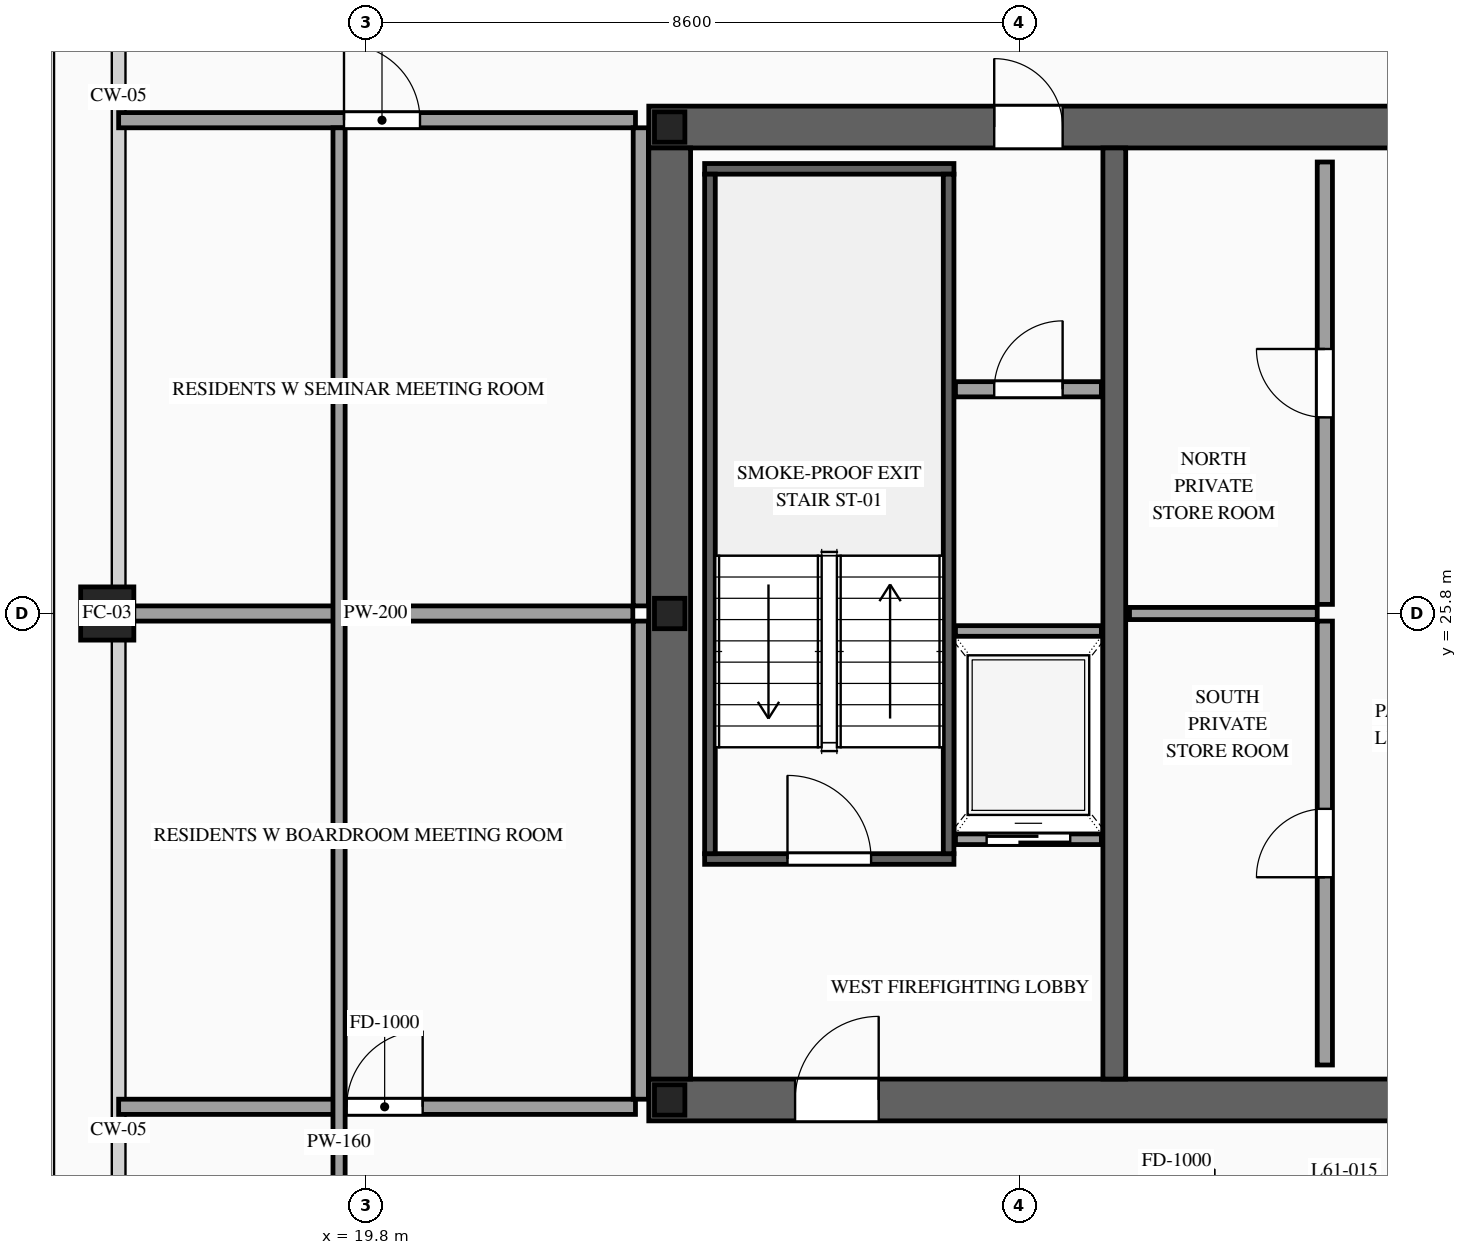
"""IFC4 building model, lengths in metres.
Left out: names, types, materials, properties, quantities, classifications, styles, units other than length and angle.
Written with IfcOpenShell. Run it as: python <this file> out.ifc"""

import sys

from ifc_helpers import new_model, si_unit, direction, frame, frame_2d, origin, origin_2d, place, context, subcontext, project, spatial, rectangle, hollow_rectangle, i_section, extrude, source, transform, mapped, element, fill, save


model = new_model("IFC4")
c1 = context("Model", 3, precision=1e-05, world=origin(), true_north=direction((0.0, 1.0)))
c2 = subcontext(c1, "Body", "Model", "MODEL_VIEW")
j1 = project(units=[si_unit("LENGTHUNIT", "METRE"), si_unit("PLANEANGLEUNIT", "RADIAN")], contexts=[c1])
p1 = place(None, origin())
s1 = spatial("IfcSite", under=j1, at=p1, CompositionType="ELEMENT")
p2 = place(p1, origin())
s2 = spatial("IfcBuilding", under=s1, at=p2, CompositionType="ELEMENT")
p3 = place(p2, frame((0.0, 0.0, 231.1)))
s3 = spatial("IfcBuildingStorey", under=s2, at=p3, CompositionType="ELEMENT", Elevation=231.1)
p4 = place(p3, frame((23.525, 19.4, 0.0), z_axis=(0.0, 0.0, 1.0), x_axis=(1.0, 0.0, 0.0)))
e1 = element("IfcWall", 1, at=p4, inside=s3, PredefinedType="SHEAR", context=c2, shape_type="SweptSolid", body=[
    extrude(rectangle(XDim=26.95, YDim=0.55, at=frame_2d((13.475, 0.0))), origin(), (0.0, 0.0, 1.0), 3.5),
])
p5 = place(p4, frame((1.925, 0.0, 0.0)))
e2 = element("IfcOpeningElement", 2, at=p5, cuts=e1, PredefinedType="OPENING", context=c2, shape_type="SweptSolid", body=[
    extrude(rectangle(XDim=1.1, YDim=2.2, at=frame_2d((0.55, 1.1))), frame((0.0, 0.29, 0.0), z_axis=(0.0, -1.0, 0.0), x_axis=(1.0, 0.0, 0.0)), (0.0, 0.0, 1.0), 0.58),
])
p6 = place(p4, frame((9.825, 0.0, 0.0)))
e3 = element("IfcOpeningElement", 3, at=p6, cuts=e1, PredefinedType="OPENING", context=c2, shape_type="SweptSolid", body=[
    extrude(rectangle(XDim=1.1, YDim=2.2, at=frame_2d((0.55, 1.1))), frame((0.0, 0.29, 0.0), z_axis=(0.0, -1.0, 0.0), x_axis=(1.0, 0.0, 0.0)), (0.0, 0.0, 1.0), 0.58),
])
p7 = place(p4, frame((23.025, 0.0, 0.0)))
e4 = element("IfcOpeningElement", 4, at=p7, cuts=e1, PredefinedType="OPENING", context=c2, shape_type="SweptSolid", body=[
    extrude(rectangle(XDim=1.1, YDim=2.2, at=frame_2d((0.55, 1.1))), frame((0.0, 0.29, 0.0), z_axis=(0.0, -1.0, 0.0), x_axis=(1.0, 0.0, 0.0)), (0.0, 0.0, 1.0), 0.58),
])
p8 = place(p4, frame((19.645, 0.0, 0.0)))
e5 = element("IfcOpeningElement", 5, at=p8, cuts=e1, PredefinedType="OPENING", context=c2, shape_type="SweptSolid", body=[
    extrude(rectangle(XDim=0.9, YDim=2.15, at=frame_2d((0.45, 1.075))), frame((0.0, 0.29, 0.0), z_axis=(0.0, -1.0, 0.0), x_axis=(1.0, 0.0, 0.0)), (0.0, 0.0, 1.0), 0.58),
])
p9 = place(p4, frame((18.205, 0.0, 0.0)))
e6 = element("IfcOpeningElement", 6, at=p9, cuts=e1, PredefinedType="OPENING", context=c2, shape_type="SweptSolid", body=[
    extrude(rectangle(XDim=0.9, YDim=2.15, at=frame_2d((0.45, 1.075))), frame((0.0, 0.29, 0.0), z_axis=(0.0, -1.0, 0.0), x_axis=(1.0, 0.0, 0.0)), (0.0, 0.0, 1.0), 0.58),
])
p10 = place(p3, frame((23.525, 32.2, 0.0), z_axis=(0.0, 0.0, 1.0), x_axis=(1.0, 0.0, 0.0)))
e7 = element("IfcWall", 7, at=p10, inside=s3, PredefinedType="SHEAR", context=c2, shape_type="SweptSolid", body=[
    extrude(rectangle(XDim=26.95, YDim=0.55, at=frame_2d((13.475, 0.0))), origin(), (0.0, 0.0, 1.0), 3.5),
])
p11 = place(p10, frame((4.545, 0.0, 0.0)))
e8 = element("IfcOpeningElement", 8, at=p11, cuts=e7, PredefinedType="OPENING", context=c2, shape_type="SweptSolid", body=[
    extrude(rectangle(XDim=0.9, YDim=2.15, at=frame_2d((0.45, 1.075))), frame((0.0, 0.29, 0.0), z_axis=(0.0, -1.0, 0.0), x_axis=(1.0, 0.0, 0.0)), (0.0, 0.0, 1.0), 0.58),
])
p12 = place(p10, frame((9.825, 0.0, 0.0)))
e9 = element("IfcOpeningElement", 9, at=p12, cuts=e7, PredefinedType="OPENING", context=c2, shape_type="SweptSolid", body=[
    extrude(rectangle(XDim=1.1, YDim=2.2, at=frame_2d((0.55, 1.1))), frame((0.0, 0.29, 0.0), z_axis=(0.0, -1.0, 0.0), x_axis=(1.0, 0.0, 0.0)), (0.0, 0.0, 1.0), 0.58),
])
p13 = place(p10, frame((15.675, 0.0, 0.0)))
e10 = element("IfcOpeningElement", 10, at=p13, cuts=e7, PredefinedType="OPENING", context=c2, shape_type="SweptSolid", body=[
    extrude(rectangle(XDim=1.1, YDim=2.2, at=frame_2d((0.55, 1.1))), frame((0.0, 0.29, 0.0), z_axis=(0.0, -1.0, 0.0), x_axis=(1.0, 0.0, 0.0)), (0.0, 0.0, 1.0), 0.58),
])
p14 = place(p10, frame((19.645, 0.0, 0.0)))
e11 = element("IfcOpeningElement", 11, at=p14, cuts=e7, PredefinedType="OPENING", context=c2, shape_type="SweptSolid", body=[
    extrude(rectangle(XDim=0.9, YDim=2.15, at=frame_2d((0.45, 1.075))), frame((0.0, 0.29, 0.0), z_axis=(0.0, -1.0, 0.0), x_axis=(1.0, 0.0, 0.0)), (0.0, 0.0, 1.0), 0.58),
])
m1 = source(origin(), c2, "Body", "SweptSolid", [
    extrude(rectangle(XDim=12.25, YDim=0.55, at=frame_2d((6.125, 0.0))), origin(), (0.0, 0.0, 1.0), 3.5),
])
p15 = place(p3, frame((23.8, 19.675, 0.0), z_axis=(0.0, 0.0, 1.0), x_axis=(0.0, 1.0, 0.0)))
e12 = element("IfcWall", 12, at=p15, inside=s3, PredefinedType="SHEAR", context=c2, shape_type="MappedRepresentation", body=[
    mapped(m1, transform((0.0, 0.0, 0.0), scale=1.0)),
])
m2 = source(origin(), c2, "Body", "SweptSolid", [
    extrude(rectangle(XDim=12.25, YDim=0.3, at=frame_2d((6.125, 0.0))), origin(), (0.0, 0.0, 1.0), 3.5),
])
p16 = place(p3, frame((29.65, 19.675, 0.0), z_axis=(0.0, 0.0, 1.0), x_axis=(0.0, 1.0, 0.0)))
e13 = element("IfcWall", 13, at=p16, inside=s3, PredefinedType="SOLIDWALL", context=c2, shape_type="MappedRepresentation", body=[
    mapped(m2, transform((0.0, 0.0, 0.0), scale=1.0)),
])
m3 = source(origin(), c2, "Body", "SweptSolid", [
    extrude(i_section(OverallWidth=0.4, OverallDepth=0.4, WebThickness=0.013, FlangeThickness=0.021, at=origin_2d()), origin(), (0.0, 0.0, 1.0), 3.5),
])
for number, where, z_axis, x_axis in (
    (14, (23.8, 19.4, 0.0), (0.0, 0.0, 1.0), (1.0, 0.0, 0.0)),
    (15, (23.8, 25.8, 0.0), (0.0, 0.0, 1.0), (1.0, 0.0, 0.0)),
    (16, (23.8, 32.2, 0.0), (0.0, 0.0, 1.0), (1.0, 0.0, 0.0)),
):
    element("IfcColumn", number, at=place(p3, frame(where, z_axis=z_axis, x_axis=x_axis)), inside=s3, PredefinedType="COLUMN", context=c2, shape_type="MappedRepresentation", body=[
        mapped(m3, transform((0.0, 0.0, 0.0), scale=1.0)),
    ])
m4 = source(origin(), c2, "Body", "SweptSolid", [
    extrude(hollow_rectangle(XDim=0.7, YDim=0.7, WallThickness=0.032, at=origin_2d()), origin(), (0.0, 0.0, 1.0), 3.5),
])
p17 = place(p3, frame((16.4, 25.8, 0.0), z_axis=(0.0, 0.0, 1.0), x_axis=(1.0, 0.0, 0.0)))
e17 = element("IfcColumn", 17, at=p17, inside=s3, PredefinedType="COLUMN", context=c2, shape_type="MappedRepresentation", body=[
    mapped(m4, transform((0.0, 0.0, 0.0), scale=1.0)),
])
p18 = place(p3, frame((27.56, 22.83, 0.0), z_axis=(0.0, 0.0, 1.0), x_axis=(1.0, 0.0, 0.0)))
e18 = element("IfcWall", 18, at=p18, inside=s3, PredefinedType="SOLIDWALL", context=c2, shape_type="SweptSolid", body=[
    extrude(rectangle(XDim=1.92, YDim=0.14, at=frame_2d((0.96, 0.0))), origin(), (0.0, 0.0, 1.0), 3.28),
])
p19 = place(p18, frame((0.41, 0.0, 0.0)))
e19 = element("IfcOpeningElement", 19, at=p19, cuts=e18, PredefinedType="OPENING", context=c2, shape_type="SweptSolid", body=[
    extrude(rectangle(XDim=1.1, YDim=2.2, at=frame_2d((0.55, 1.1))), frame((0.0, 0.085, 0.0), z_axis=(0.0, -1.0, 0.0), x_axis=(1.0, 0.0, 0.0)), (0.0, 0.0, 1.0), 0.17),
])
m5 = source(origin(), c2, "Body", "SweptSolid", [
    extrude(rectangle(XDim=1.92, YDim=0.14, at=frame_2d((0.96, 0.0))), origin(), (0.0, 0.0, 1.0), 3.28),
])
p20 = place(p3, frame((27.56, 25.57, 0.0), z_axis=(0.0, 0.0, 1.0), x_axis=(1.0, 0.0, 0.0)))
e20 = element("IfcWall", 20, at=p20, inside=s3, PredefinedType="SOLIDWALL", context=c2, shape_type="MappedRepresentation", body=[
    mapped(m5, transform((0.0, 0.0, 0.0), scale=1.0)),
])
p21 = place(p3, frame((24.26, 22.57, 0.0), z_axis=(0.0, 0.0, 1.0), x_axis=(1.0, 0.0, 0.0)))
e21 = element("IfcWall", 21, at=p21, inside=s3, PredefinedType="SOLIDWALL", context=c2, shape_type="SweptSolid", body=[
    extrude(rectangle(XDim=3.28, YDim=0.14, at=frame_2d((1.64, 0.0))), origin(), (0.0, 0.0, 1.0), 3.28),
])
p22 = place(p21, frame((1.09, 0.0, 0.0)))
e22 = element("IfcOpeningElement", 22, at=p22, cuts=e21, PredefinedType="OPENING", context=c2, shape_type="SweptSolid", body=[
    extrude(rectangle(XDim=1.1, YDim=2.2, at=frame_2d((0.55, 1.1))), frame((0.0, 0.085, 0.0), z_axis=(0.0, -1.0, 0.0), x_axis=(1.0, 0.0, 0.0)), (0.0, 0.0, 1.0), 0.17),
])
m6 = source(origin(), c2, "Body", "SweptSolid", [
    extrude(rectangle(XDim=3.28, YDim=0.14, at=frame_2d((1.64, 0.0))), origin(), (0.0, 0.0, 1.0), 3.28),
])
p23 = place(p3, frame((24.26, 31.65, 0.0), z_axis=(0.0, 0.0, 1.0), x_axis=(1.0, 0.0, 0.0)))
e23 = element("IfcWall", 23, at=p23, inside=s3, PredefinedType="SOLIDWALL", context=c2, shape_type="MappedRepresentation", body=[
    mapped(m6, transform((0.0, 0.0, 0.0), scale=1.0)),
])
m7 = source(origin(), c2, "Body", "SweptSolid", [
    extrude(rectangle(XDim=8.94, YDim=0.14, at=frame_2d((4.47, 0.0))), origin(), (0.0, 0.0, 1.0), 3.28),
])
for number, where, z_axis, x_axis in (
    (24, (24.33, 22.64, 0.0), (0.0, 0.0, 1.0), (0.0, 1.0, 0.0)),
    (25, (27.47, 22.64, 0.0), (0.0, 0.0, 1.0), (0.0, 1.0, 0.0)),
):
    element("IfcWall", number, at=place(p3, frame(where, z_axis=z_axis, x_axis=x_axis)), inside=s3, PredefinedType="SOLIDWALL", context=c2, shape_type="MappedRepresentation", body=[
        mapped(m7, transform((0.0, 0.0, 0.0), scale=1.0)),
    ])
p24 = place(p3, frame((27.56, 28.75, 0.0), z_axis=(0.0, 0.0, 1.0), x_axis=(1.0, 0.0, 0.0)))
e26 = element("IfcWall", 26, at=p24, inside=s3, PredefinedType="PARTITIONING", context=c2, shape_type="SweptSolid", body=[
    extrude(rectangle(XDim=1.92, YDim=0.2, at=frame_2d((0.96, 0.0))), origin(), (0.0, 0.0, 1.0), 3.28),
])
p25 = place(p24, frame((0.51, 0.0, 0.0)))
e27 = element("IfcOpeningElement", 27, at=p25, cuts=e26, PredefinedType="OPENING", context=c2, shape_type="SweptSolid", body=[
    extrude(rectangle(XDim=0.9, YDim=2.15, at=frame_2d((0.45, 1.075))), frame((0.0, 0.115, 0.0), z_axis=(0.0, -1.0, 0.0), x_axis=(1.0, 0.0, 0.0)), (0.0, 0.0, 1.0), 0.23),
])
p26 = place(p3, frame((32.42, 19.86, 0.0), z_axis=(0.0, 0.0, 1.0), x_axis=(0.0, 1.0, 0.0)))
e28 = element("IfcWall", 28, at=p26, inside=s3, PredefinedType="PARTITIONING", context=c2, shape_type="SweptSolid", body=[
    extrude(rectangle(XDim=5.84, YDim=0.2, at=frame_2d((2.92, 0.0))), origin(), (0.0, 0.0, 1.0), 3.28),
])
p27 = place(p26, frame((2.47, 0.0, 0.0)))
e29 = element("IfcOpeningElement", 29, at=p27, cuts=e28, PredefinedType="OPENING", context=c2, shape_type="SweptSolid", body=[
    extrude(rectangle(XDim=0.9, YDim=2.15, at=frame_2d((0.45, 1.075))), frame((0.0, 0.115, 0.0), z_axis=(0.0, -1.0, 0.0), x_axis=(1.0, 0.0, 0.0)), (0.0, 0.0, 1.0), 0.23),
])
p28 = place(p3, frame((32.42, 25.92, 0.0), z_axis=(0.0, 0.0, 1.0), x_axis=(0.0, 1.0, 0.0)))
e30 = element("IfcWall", 30, at=p28, inside=s3, PredefinedType="PARTITIONING", context=c2, shape_type="SweptSolid", body=[
    extrude(rectangle(XDim=5.82, YDim=0.2, at=frame_2d((2.91, 0.0))), origin(), (0.0, 0.0, 1.0), 3.28),
])
p29 = place(p28, frame((2.46, 0.0, 0.0)))
e31 = element("IfcOpeningElement", 31, at=p29, cuts=e30, PredefinedType="OPENING", context=c2, shape_type="SweptSolid", body=[
    extrude(rectangle(XDim=0.9, YDim=2.15, at=frame_2d((0.45, 1.075))), frame((0.0, 0.115, 0.0), z_axis=(0.0, -1.0, 0.0), x_axis=(1.0, 0.0, 0.0)), (0.0, 0.0, 1.0), 0.23),
])
m8 = source(origin(), c2, "Body", "SweptSolid", [
    extrude(rectangle(XDim=2.47, YDim=0.16, at=frame_2d((1.235, 0.0))), origin(), (0.0, 0.0, 1.0), 3.28),
])
p30 = place(p3, frame((29.85, 25.8, 0.0), z_axis=(0.0, 0.0, 1.0), x_axis=(1.0, 0.0, 0.0)))
e32 = element("IfcWall", 32, at=p30, inside=s3, PredefinedType="PARTITIONING", context=c2, shape_type="MappedRepresentation", body=[
    mapped(m8, transform((0.0, 0.0, 0.0), scale=1.0)),
])
p31 = place(p3, frame((16.55, 19.31, 0.0), z_axis=(0.0, 0.0, 1.0), x_axis=(1.0, 0.0, 0.0)))
e33 = element("IfcWall", 33, at=p31, inside=s3, PredefinedType="PARTITIONING", context=c2, shape_type="SweptSolid", body=[
    extrude(rectangle(XDim=6.8, YDim=0.2, at=frame_2d((3.4, 0.0))), origin(), (0.0, 0.0, 1.0), 2.825),
])
p32 = place(p31, frame((3.0, 0.0, 0.0)))
e34 = element("IfcOpeningElement", 34, at=p32, cuts=e33, PredefinedType="OPENING", context=c2, shape_type="SweptSolid", body=[
    extrude(rectangle(XDim=1.0, YDim=2.2, at=frame_2d((0.5, 1.1))), frame((0.0, 0.115, 0.0), z_axis=(0.0, -1.0, 0.0), x_axis=(1.0, 0.0, 0.0)), (0.0, 0.0, 1.0), 0.23),
])
m9 = source(origin(), c2, "Body", "SweptSolid", [
    extrude(rectangle(XDim=6.765, YDim=0.2, at=frame_2d((3.382, 0.0))), origin(), (0.0, 0.0, 1.0), 2.787),
])
p33 = place(p3, frame((16.55, 25.8, 0.0), z_axis=(0.0, 0.0, 1.0), x_axis=(1.0, 0.0, 0.0)))
e35 = element("IfcWall", 35, at=p33, inside=s3, PredefinedType="PARTITIONING", context=c2, shape_type="MappedRepresentation", body=[
    mapped(m9, transform((0.0, 0.0, 0.0), scale=1.0)),
])
m10 = source(origin(), c2, "Body", "SweptSolid", [
    extrude(rectangle(XDim=6.29, YDim=0.2, at=frame_2d((3.145, 0.0))), origin(), (0.0, 0.0, 1.0), 3.28),
])
p34 = place(p3, frame((23.42, 19.41, 0.0), z_axis=(0.0, 0.0, 1.0), x_axis=(0.0, 1.0, 0.0)))
e36 = element("IfcWall", 36, at=p34, inside=s3, PredefinedType="PARTITIONING", context=c2, shape_type="MappedRepresentation", body=[
    mapped(m10, transform((0.0, 0.0, 0.0), scale=1.0)),
])
p35 = place(p3, frame((16.55, 32.29, 0.0), z_axis=(0.0, 0.0, 1.0), x_axis=(1.0, 0.0, 0.0)))
e37 = element("IfcWall", 37, at=p35, inside=s3, PredefinedType="PARTITIONING", context=c2, shape_type="SweptSolid", body=[
    extrude(rectangle(XDim=6.8, YDim=0.2, at=frame_2d((3.4, 0.0))), origin(), (0.0, 0.0, 1.0), 2.825),
])
p36 = place(p35, frame((2.965, 0.0, 0.0)))
e38 = element("IfcOpeningElement", 38, at=p36, cuts=e37, PredefinedType="OPENING", context=c2, shape_type="SweptSolid", body=[
    extrude(rectangle(XDim=1.0, YDim=2.2, at=frame_2d((0.5, 1.1))), frame((0.0, 0.115, 0.0), z_axis=(0.0, -1.0, 0.0), x_axis=(1.0, 0.0, 0.0)), (0.0, 0.0, 1.0), 0.23),
])
m11 = source(origin(), c2, "Body", "SweptSolid", [
    extrude(rectangle(XDim=26.69, YDim=0.16, at=frame_2d((13.345, 0.0))), origin(), (0.0, 0.0, 1.0), 3.28),
])
p37 = place(p3, frame((19.45, 5.5, 0.0), z_axis=(0.0, 0.0, 1.0), x_axis=(0.0, 1.0, 0.0)))
e39 = element("IfcWall", 39, at=p37, inside=s3, PredefinedType="PARTITIONING", context=c2, shape_type="MappedRepresentation", body=[
    mapped(m11, transform((0.0, 0.0, 0.0), scale=1.0)),
])
p38 = place(p3, frame((23.42, 25.9, 0.0), z_axis=(0.0, 0.0, 1.0), x_axis=(0.0, 1.0, 0.0)))
e40 = element("IfcWall", 40, at=p38, inside=s3, PredefinedType="PARTITIONING", context=c2, shape_type="MappedRepresentation", body=[
    mapped(m10, transform((0.0, 0.0, 0.0), scale=1.0)),
])
m12 = source(origin(), c2, "Body", "SweptSolid", [
    extrude(rectangle(XDim=1.1, YDim=2.2, at=frame_2d((0.55, 1.1))), frame((0.0, 0.025, 0.0), z_axis=(0.0, -1.0, 0.0), x_axis=(1.0, 0.0, 0.0)), (0.0, 0.0, 1.0), 0.05),
])
p39 = place(p19, origin())
e41 = element("IfcDoor", 41, at=p39, inside=s3, OperationType="SLIDING_TO_LEFT", PredefinedType="DOOR", context=c2, shape_type="MappedRepresentation", body=[
    mapped(m12, transform((0.0, 0.0, 0.0), scale=1.0)),
])
fill(e19, e41)
m13 = source(origin(), c2, "Body", "SweptSolid", [
    extrude(rectangle(XDim=1.1, YDim=2.2, at=frame_2d((0.55, 1.1))), frame((0.0, 0.025, 0.0), z_axis=(0.0, -1.0, 0.0), x_axis=(1.0, 0.0, 0.0)), (0.0, 0.0, 1.0), 0.05),
])
p40 = place(p22, origin())
e42 = element("IfcDoor", 42, at=p40, inside=s3, OperationType="SINGLE_SWING_LEFT", PredefinedType="DOOR", context=c2, shape_type="MappedRepresentation", body=[
    mapped(m13, transform((0.0, 0.0, 0.0), scale=1.0)),
])
fill(e22, e42)
p41 = place(p5, origin())
e43 = element("IfcDoor", 43, at=p41, inside=s3, OperationType="SINGLE_SWING_RIGHT", PredefinedType="DOOR", context=c2, shape_type="MappedRepresentation", body=[
    mapped(m13, transform((0.0, 0.0, 0.0), scale=1.0)),
])
fill(e2, e43)
m14 = source(origin(), c2, "Body", "SweptSolid", [
    extrude(rectangle(XDim=0.9, YDim=2.15, at=frame_2d((0.45, 1.075))), frame((0.0, 0.025, 0.0), z_axis=(0.0, -1.0, 0.0), x_axis=(1.0, 0.0, 0.0)), (0.0, 0.0, 1.0), 0.05),
])
p42 = place(p11, origin())
e44 = element("IfcDoor", 44, at=p42, inside=s3, OperationType="SINGLE_SWING_LEFT", PredefinedType="DOOR", context=c2, shape_type="MappedRepresentation", body=[
    mapped(m14, transform((0.0, 0.0, 0.0), scale=1.0)),
])
fill(e8, e44)
p43 = place(p25, origin())
e45 = element("IfcDoor", 45, at=p43, inside=s3, OperationType="SINGLE_SWING_RIGHT", PredefinedType="DOOR", context=c2, shape_type="MappedRepresentation", body=[
    mapped(m14, transform((0.0, 0.0, 0.0), scale=1.0)),
])
fill(e27, e45)
p44 = place(p27, origin())
e46 = element("IfcDoor", 46, at=p44, inside=s3, OperationType="SINGLE_SWING_LEFT", PredefinedType="DOOR", context=c2, shape_type="MappedRepresentation", body=[
    mapped(m14, transform((0.0, 0.0, 0.0), scale=1.0)),
])
fill(e29, e46)
p45 = place(p29, origin())
e47 = element("IfcDoor", 47, at=p45, inside=s3, OperationType="SINGLE_SWING_RIGHT", PredefinedType="DOOR", context=c2, shape_type="MappedRepresentation", body=[
    mapped(m14, transform((0.0, 0.0, 0.0), scale=1.0)),
])
fill(e31, e47)
m15 = source(origin(), c2, "Body", "SweptSolid", [
    extrude(rectangle(XDim=1.0, YDim=2.2, at=frame_2d((0.5, 1.1))), frame((0.0, 0.025, 0.0), z_axis=(0.0, -1.0, 0.0), x_axis=(1.0, 0.0, 0.0)), (0.0, 0.0, 1.0), 0.05),
])
p46 = place(p32, origin())
e48 = element("IfcDoor", 48, at=p46, inside=s3, OperationType="SINGLE_SWING_RIGHT", PredefinedType="DOOR", context=c2, shape_type="MappedRepresentation", body=[
    mapped(m15, transform((0.0, 0.0, 0.0), scale=1.0)),
])
fill(e34, e48)
p47 = place(p36, origin())
e49 = element("IfcDoor", 49, at=p47, inside=s3, OperationType="SINGLE_SWING_LEFT", PredefinedType="DOOR", context=c2, shape_type="MappedRepresentation", body=[
    mapped(m15, transform((0.0, 0.0, 0.0), scale=1.0)),
])
fill(e38, e49)
save(model, sys.argv[1])
